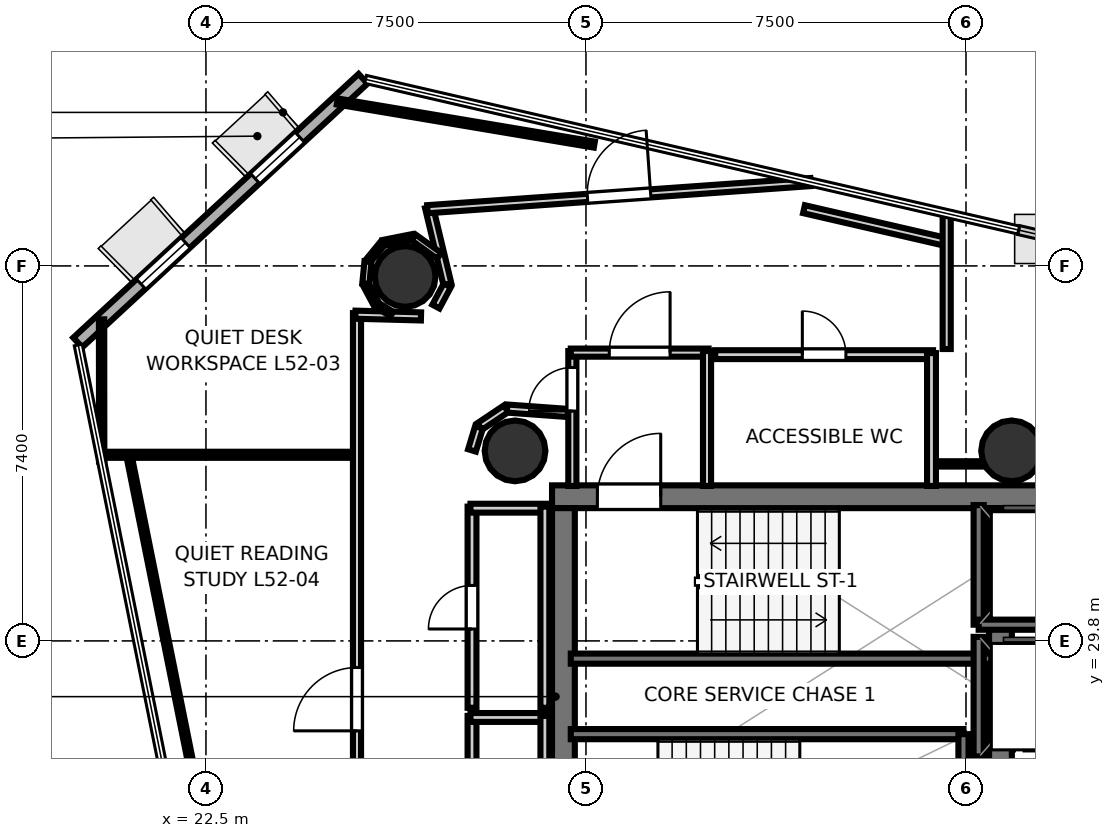
"""IFC4 building model, lengths in metres.
Left out: names, types, materials, properties, quantities, classifications, styles, units other than length and angle.
Written with IfcOpenShell. Run it as: python <this file> out.ifc"""

import sys

from ifc_helpers import new_model, si_unit, direction, frame, frame_2d, origin, origin_2d, place, context, subcontext, project, spatial, rectangle, hollow_circle, extrude, element, fill, save


model = new_model("IFC4")
c1 = context("Model", 3, precision=1e-05, world=origin(), true_north=direction((0.0, 1.0)))
c2 = subcontext(c1, "Body", "Model", "MODEL_VIEW")
j1 = project(units=[si_unit("LENGTHUNIT", "METRE"), si_unit("PLANEANGLEUNIT", "RADIAN")], contexts=[c1])
p1 = place(None, origin())
s1 = spatial("IfcSite", under=j1, at=p1, CompositionType="ELEMENT")
p2 = place(p1, origin())
s2 = spatial("IfcBuilding", under=s1, at=p2, CompositionType="ELEMENT")
p3 = place(p2, frame((0.0, 0.0, 204.0)))
s3 = spatial("IfcBuildingStorey", under=s2, at=p3, CompositionType="ELEMENT", Elevation=204.0)
p4 = place(p3, frame((29.33, 32.645, 0.0), z_axis=(0.0, 0.0, 1.0), x_axis=(1.0, 0.0, 0.0)))
e1 = element("IfcWall", 1, at=p4, inside=s3, PredefinedType="SHEAR", context=c2, shape_type="SweptSolid", body=[
    extrude(rectangle(XDim=10.52, YDim=0.45, at=frame_2d((5.26, 0.0))), origin(), (0.0, 0.0, 1.0), 3.52),
])
p5 = place(p4, frame((0.895, 0.0, 0.0)))
e2 = element("IfcOpeningElement", 2, at=p5, cuts=e1, PredefinedType="OPENING", context=c2, shape_type="SweptSolid", body=[
    extrude(rectangle(XDim=1.25, YDim=2.15, at=frame_2d((0.625, 1.075))), frame((0.0, 0.235, 0.0), z_axis=(0.0, -1.0, 0.0), x_axis=(1.0, 0.0, 0.0)), (0.0, 0.0, 1.0), 0.47),
])
for number, where, z_axis, x_axis in (
    (3, (29.555, 24.98, 0.0), (0.0, 0.0, 1.0), (0.0, 1.0, 0.0)),
    (4, (38.18, 24.98, 0.0), (0.0, 0.0, 1.0), (0.0, 1.0, 0.0)),
):
    element("IfcWall", number, at=place(p3, frame(where, z_axis=z_axis, x_axis=x_axis)), inside=s3, PredefinedType="SHEAR", context=c2, shape_type="SweptSolid", body=[
        extrude(rectangle(XDim=7.44, YDim=0.45, at=frame_2d((3.72, 0.0))), origin(), (0.0, 0.0, 1.0), 3.52),
    ])
for number, where, z_axis, x_axis in (
    (5, (28.6, 33.55, 0.0), (0.0, 0.0, 1.0), (1.0, 0.0, 0.0)),
    (6, (38.4, 33.55, 0.0), (0.0, 0.0, 1.0), (1.0, 0.0, 0.0)),
    (7, (26.431, 36.992, 0.0), (0.0, 0.0, 1.0), (1.0, 0.0, 0.0)),
):
    element("IfcColumn", number, at=place(p3, frame(where, z_axis=z_axis, x_axis=x_axis)), inside=s3, PredefinedType="COLUMN", context=c2, shape_type="SweptSolid", body=[
        extrude(hollow_circle(Radius=0.6, WallThickness=0.03, at=origin_2d()), origin(), (0.0, 0.0, 1.0), 3.7),
    ])
p6 = place(p3, frame((25.601, 40.893, 0.0), z_axis=(0.0, 0.0, 1.0), x_axis=(-0.734371177533, -0.678748092896, 0.0)))
e8 = element("IfcWall", 8, at=p6, inside=s3, PredefinedType="SOLIDWALL", context=c2, shape_type="SweptSolid", body=[
    extrude(rectangle(XDim=7.668, YDim=0.26, at=frame_2d((3.834, 0.0))), origin(), (0.0, 0.0, 1.0), 3.52),
])
p7 = place(p6, frame((1.7, 0.0, 0.9)))
e9 = element("IfcOpeningElement", 9, at=p7, cuts=e8, PredefinedType="OPENING", context=c2, shape_type="SweptSolid", body=[
    extrude(rectangle(XDim=1.2, YDim=2.0, at=frame_2d((0.6, 1.0))), frame((0.0, 0.14, 0.0), z_axis=(0.0, -1.0, 0.0), x_axis=(1.0, 0.0, 0.0)), (0.0, 0.0, 1.0), 0.28),
])
p8 = place(p6, frame((4.768, 0.0, 0.9)))
e10 = element("IfcOpeningElement", 10, at=p8, cuts=e8, PredefinedType="OPENING", context=c2, shape_type="SweptSolid", body=[
    extrude(rectangle(XDim=1.2, YDim=2.0, at=frame_2d((0.6, 1.0))), frame((0.0, 0.14, 0.0), z_axis=(0.0, -1.0, 0.0), x_axis=(1.0, 0.0, 0.0)), (0.0, 0.0, 1.0), 0.28),
])
p9 = place(p3, frame((29.7, 29.45, 0.0), z_axis=(0.0, 0.0, 1.0), x_axis=(1.0, 0.0, 0.0)))
e11 = element("IfcWall", 11, at=p9, inside=s3, PredefinedType="SOLIDWALL", context=c2, shape_type="SweptSolid", body=[
    extrude(rectangle(XDim=8.3, YDim=0.2, at=frame_2d((4.15, 0.0))), origin(), (0.0, 0.0, 1.0), 3.52),
])
p10 = place(p3, frame((29.7, 27.96, 0.0), z_axis=(0.0, 0.0, 1.0), x_axis=(1.0, 0.0, 0.0)))
e12 = element("IfcWall", 12, at=p10, inside=s3, PredefinedType="SOLIDWALL", context=c2, shape_type="SweptSolid", body=[
    extrude(rectangle(XDim=7.75, YDim=0.2, at=frame_2d((3.875, 0.0))), origin(), (0.0, 0.0, 1.0), 3.52),
])
p11 = place(p3, frame((37.45, 24.9, 0.0), z_axis=(0.0, 0.0, 1.0), x_axis=(0.0, 1.0, 0.0)))
e13 = element("IfcWall", 13, at=p11, inside=s3, PredefinedType="SOLIDWALL", context=c2, shape_type="SweptSolid", body=[
    extrude(rectangle(XDim=3.06, YDim=0.2, at=frame_2d((1.53, 0.0))), origin(), (0.0, 0.0, 1.0), 3.52),
])
p12 = place(p3, frame((37.75, 30.12, 0.0), z_axis=(0.0, 0.0, 1.0), x_axis=(0.0, 1.0, 0.0)))
e14 = element("IfcWall", 14, at=p12, inside=s3, PredefinedType="SOLIDWALL", context=c2, shape_type="SweptSolid", body=[
    extrude(rectangle(XDim=2.36, YDim=0.2, at=frame_2d((1.18, 0.0))), origin(), (0.0, 0.0, 1.0), 3.52),
])
p13 = place(p3, frame((37.75, 30.12, 0.0), z_axis=(0.0, 0.0, 1.0), x_axis=(1.0, 0.0, 0.0)))
e15 = element("IfcWall", 15, at=p13, inside=s3, PredefinedType="SOLIDWALL", context=c2, shape_type="SweptSolid", body=[
    extrude(rectangle(XDim=2.1, YDim=0.2, at=frame_2d((1.05, 0.0))), origin(), (0.0, 0.0, 1.0), 3.52),
])
p14 = place(p3, frame((37.75, 27.52, 0.0), z_axis=(0.0, 0.0, 1.0), x_axis=(0.0, 1.0, 0.0)))
e16 = element("IfcWall", 16, at=p14, inside=s3, PredefinedType="SOLIDWALL", context=c2, shape_type="SweptSolid", body=[
    extrude(rectangle(XDim=2.36, YDim=0.2, at=frame_2d((1.18, 0.0))), origin(), (0.0, 0.0, 1.0), 3.52),
])
p15 = place(p3, frame((29.731, 32.858, 0.0), z_axis=(0.0, 0.0, 1.0), x_axis=(0.0, 1.0, 0.0)))
e17 = element("IfcWall", 17, at=p15, inside=s3, PredefinedType="PARTITIONING", context=c2, shape_type="SweptSolid", body=[
    extrude(rectangle(XDim=2.662, YDim=0.16, at=frame_2d((1.331, 0.0))), origin(), (0.0, 0.0, 1.0), 2.84),
])
p16 = place(p15, frame((1.478, 0.0, 0.0)))
e18 = element("IfcOpeningElement", 18, at=p16, cuts=e17, PredefinedType="OPENING", context=c2, shape_type="SweptSolid", body=[
    extrude(rectangle(XDim=0.86, YDim=2.05, at=frame_2d((0.43, 1.025))), frame((0.0, 0.09, 0.0), z_axis=(0.0, -1.0, 0.0), x_axis=(1.0, 0.0, 0.0)), (0.0, 0.0, 1.0), 0.18),
])
p17 = place(p3, frame((29.7, 35.489, 0.0), z_axis=(0.0, 0.0, 1.0), x_axis=(1.0, 0.0, 0.0)))
e19 = element("IfcWall", 19, at=p17, inside=s3, PredefinedType="PARTITIONING", context=c2, shape_type="SweptSolid", body=[
    extrude(rectangle(XDim=2.72, YDim=0.16, at=frame_2d((1.36, 0.0))), origin(), (0.0, 0.0, 1.0), 2.84),
])
p18 = place(p17, frame((0.76, 0.0, 0.0)))
e20 = element("IfcOpeningElement", 20, at=p18, cuts=e19, PredefinedType="OPENING", context=c2, shape_type="SweptSolid", body=[
    extrude(rectangle(XDim=1.2, YDim=2.15, at=frame_2d((0.6, 1.075))), frame((0.0, 0.09, 0.0), z_axis=(0.0, -1.0, 0.0), x_axis=(1.0, 0.0, 0.0)), (0.0, 0.0, 1.0), 0.18),
])
p19 = place(p3, frame((32.389, 35.52, 0.0), z_axis=(0.0, 0.0, 1.0), x_axis=(0.0, -1.0, 0.0)))
e21 = element("IfcWall", 21, at=p19, inside=s3, PredefinedType="PARTITIONING", context=c2, shape_type="SweptSolid", body=[
    extrude(rectangle(XDim=2.662, YDim=0.16, at=frame_2d((1.331, 0.0))), origin(), (0.0, 0.0, 1.0), 2.84),
])
p20 = place(p3, frame((32.55, 35.449, 0.0), z_axis=(0.0, 0.0, 1.0), x_axis=(1.0, 0.0, 0.0)))
e22 = element("IfcWall", 22, at=p20, inside=s3, PredefinedType="PLUMBINGWALL", context=c2, shape_type="SweptSolid", body=[
    extrude(rectangle(XDim=4.3, YDim=0.175, at=frame_2d((2.15, 0.0))), origin(), (0.0, 0.0, 1.0), 2.84),
])
p21 = place(p20, frame((1.72, 0.0, 0.0)))
e23 = element("IfcOpeningElement", 23, at=p21, cuts=e22, PredefinedType="OPENING", context=c2, shape_type="SweptSolid", body=[
    extrude(rectangle(XDim=0.86, YDim=2.05, at=frame_2d((0.43, 1.025))), frame((0.0, 0.097, 0.0), z_axis=(0.0, -1.0, 0.0), x_axis=(1.0, 0.0, 0.0)), (0.0, 0.0, 1.0), 0.195),
])
p22 = place(p3, frame((36.819, 35.48, 0.0), z_axis=(0.0, 0.0, 1.0), x_axis=(0.0, -1.0, 0.0)))
e24 = element("IfcWall", 24, at=p22, inside=s3, PredefinedType="PLUMBINGWALL", context=c2, shape_type="SweptSolid", body=[
    extrude(rectangle(XDim=2.622, YDim=0.175, at=frame_2d((1.311, 0.0))), origin(), (0.0, 0.0, 1.0), 2.84),
])
p23 = place(p3, frame((27.751, 25.0, 0.0), z_axis=(0.0, 0.0, 1.0), x_axis=(0.0, 1.0, 0.0)))
e25 = element("IfcWall", 25, at=p23, inside=s3, PredefinedType="PLUMBINGWALL", context=c2, shape_type="SweptSolid", body=[
    extrude(rectangle(XDim=3.32, YDim=0.175, at=frame_2d((1.66, 0.0))), origin(), (0.0, 0.0, 1.0), 2.84),
])
p24 = place(p23, frame((1.21, 0.0, 0.0)))
e26 = element("IfcOpeningElement", 26, at=p24, cuts=e25, PredefinedType="OPENING", context=c2, shape_type="SweptSolid", body=[
    extrude(rectangle(XDim=0.9, YDim=2.1, at=frame_2d((0.45, 1.05))), frame((0.0, 0.097, 0.0), z_axis=(0.0, -1.0, 0.0), x_axis=(1.0, 0.0, 0.0)), (0.0, 0.0, 1.0), 0.195),
])
p25 = place(p3, frame((27.72, 28.289, 0.0), z_axis=(0.0, 0.0, 1.0), x_axis=(1.0, 0.0, 0.0)))
e27 = element("IfcWall", 27, at=p25, inside=s3, PredefinedType="PLUMBINGWALL", context=c2, shape_type="SweptSolid", body=[
    extrude(rectangle(XDim=1.5, YDim=0.175, at=frame_2d((0.75, 0.0))), origin(), (0.0, 0.0, 1.0), 2.84),
])
p26 = place(p3, frame((29.189, 28.32, 0.0), z_axis=(0.0, 0.0, 1.0), x_axis=(0.0, -1.0, 0.0)))
e28 = element("IfcWall", 28, at=p26, inside=s3, PredefinedType="PLUMBINGWALL", context=c2, shape_type="SweptSolid", body=[
    extrude(rectangle(XDim=3.32, YDim=0.175, at=frame_2d((1.66, 0.0))), origin(), (0.0, 0.0, 1.0), 2.84),
])
p27 = place(p3, frame((27.751, 28.48, 0.0), z_axis=(0.0, 0.0, 1.0), x_axis=(0.0, 1.0, 0.0)))
e29 = element("IfcWall", 29, at=p27, inside=s3, PredefinedType="PLUMBINGWALL", context=c2, shape_type="SweptSolid", body=[
    extrude(rectangle(XDim=3.97, YDim=0.175, at=frame_2d((1.985, 0.0))), origin(), (0.0, 0.0, 1.0), 2.84),
])
p28 = place(p27, frame((1.555, 0.0, 0.0)))
e30 = element("IfcOpeningElement", 30, at=p28, cuts=e29, PredefinedType="OPENING", context=c2, shape_type="SweptSolid", body=[
    extrude(rectangle(XDim=0.86, YDim=2.05, at=frame_2d((0.43, 1.025))), frame((0.0, 0.097, 0.0), z_axis=(0.0, -1.0, 0.0), x_axis=(1.0, 0.0, 0.0)), (0.0, 0.0, 1.0), 0.195),
])
p29 = place(p3, frame((27.72, 32.419, 0.0), z_axis=(0.0, 0.0, 1.0), x_axis=(1.0, 0.0, 0.0)))
e31 = element("IfcWall", 31, at=p29, inside=s3, PredefinedType="PLUMBINGWALL", context=c2, shape_type="SweptSolid", body=[
    extrude(rectangle(XDim=1.5, YDim=0.175, at=frame_2d((0.75, 0.0))), origin(), (0.0, 0.0, 1.0), 2.84),
])
p30 = place(p3, frame((29.189, 32.45, 0.0), z_axis=(0.0, 0.0, 1.0), x_axis=(0.0, -1.0, 0.0)))
e32 = element("IfcWall", 32, at=p30, inside=s3, PredefinedType="PLUMBINGWALL", context=c2, shape_type="SweptSolid", body=[
    extrude(rectangle(XDim=3.97, YDim=0.175, at=frame_2d((1.985, 0.0))), origin(), (0.0, 0.0, 1.0), 2.84),
])
p31 = place(p3, frame((27.265, 36.839, 0.0), z_axis=(0.0, 0.0, 1.0), x_axis=(-0.232734022169, 0.972540423286, 0.0)))
e33 = element("IfcWall", 33, at=p31, inside=s3, PredefinedType="PARTITIONING", context=c2, shape_type="SweptSolid", body=[
    extrude(rectangle(XDim=1.561, YDim=0.16, at=frame_2d((0.781, 0.0))), origin(), (0.0, 0.0, 1.0), 2.84),
])
p32 = place(p3, frame((26.872, 38.319, 0.0), z_axis=(0.0, 0.0, 1.0), x_axis=(0.997497948336, 0.070695424642, 0.0)))
e34 = element("IfcWall", 34, at=p32, inside=s3, PredefinedType="PARTITIONING", context=c2, shape_type="SweptSolid", body=[
    extrude(rectangle(XDim=7.58, YDim=0.16, at=frame_2d((3.79, 0.0))), origin(), (0.0, 0.0, 1.0), 2.84),
])
p33 = place(p32, frame((3.165, 0.0, 0.0)))
e35 = element("IfcOpeningElement", 35, at=p33, cuts=e34, PredefinedType="OPENING", context=c2, shape_type="SweptSolid", body=[
    extrude(rectangle(XDim=1.25, YDim=2.2, at=frame_2d((0.625, 1.1))), frame((0.0, 0.09, 0.0), z_axis=(0.0, -1.0, 0.0), x_axis=(1.0, 0.0, 0.0)), (0.0, 0.0, 1.0), 0.18),
])
p34 = place(p3, frame((34.302, 38.32, 0.0), z_axis=(0.0, 0.0, 1.0), x_axis=(0.974391195695, -0.224859506699, 0.0)))
e36 = element("IfcWall", 36, at=p34, inside=s3, PredefinedType="PARTITIONING", context=c2, shape_type="SweptSolid", body=[
    extrude(rectangle(XDim=2.915, YDim=0.16, at=frame_2d((1.458, 0.0))), origin(), (0.0, 0.0, 1.0), 2.84),
])
p35 = place(p3, frame((37.119, 38.255, 0.0), z_axis=(0.0, 0.0, 1.0), x_axis=(0.0, -1.0, 0.0)))
e37 = element("IfcWall", 37, at=p35, inside=s3, PredefinedType="PARTITIONING", context=c2, shape_type="SweptSolid", body=[
    extrude(rectangle(XDim=2.695, YDim=0.16, at=frame_2d((1.348, 0.0))), origin(), (0.0, 0.0, 1.0), 2.84),
])
p36 = place(p3, frame((29.64, 34.299, 0.0), z_axis=(0.0, 0.0, 1.0), x_axis=(-0.997392224386, 0.072171675429, 0.0)))
e38 = element("IfcWall", 38, at=p36, inside=s3, PredefinedType="PARTITIONING", context=c2, shape_type="SweptSolid", body=[
    extrude(rectangle(XDim=1.201, YDim=0.16, at=frame_2d((0.601, 0.0))), origin(), (0.0, 0.0, 1.0), 2.84),
])
p37 = place(p3, frame((28.423, 34.38, 0.0), z_axis=(0.0, 0.0, 1.0), x_axis=(-0.831571279003, -0.555418047903, 0.0)))
e39 = element("IfcWall", 39, at=p37, inside=s3, PredefinedType="PARTITIONING", context=c2, shape_type="SweptSolid", body=[
    extrude(rectangle(XDim=0.628, YDim=0.16, at=frame_2d((0.314, 0.0))), origin(), (0.0, 0.0, 1.0), 2.84),
])
p38 = place(p3, frame((27.888, 34.015, 0.0), z_axis=(0.0, 0.0, 1.0), x_axis=(-0.290263585829, -0.956946733492, 0.0)))
e40 = element("IfcWall", 40, at=p38, inside=s3, PredefinedType="PARTITIONING", context=c2, shape_type="SweptSolid", body=[
    extrude(rectangle(XDim=0.476, YDim=0.16, at=frame_2d((0.238, 0.0))), origin(), (0.0, 0.0, 1.0), 2.84),
])
p39 = place(p3, frame((25.481, 18.05, 0.0), z_axis=(0.0, 0.0, 1.0), x_axis=(0.0, 1.0, 0.0)))
e41 = element("IfcWall", 41, at=p39, inside=s3, PredefinedType="PARTITIONING", context=c2, shape_type="SweptSolid", body=[
    extrude(rectangle(XDim=18.219, YDim=0.16, at=frame_2d((9.109, 0.0))), origin(), (0.0, 0.0, 1.0), 2.84),
])
p40 = place(p39, frame((0.23, 0.0, 0.0)))
e42 = element("IfcOpeningElement", 42, at=p40, cuts=e41, PredefinedType="OPENING", context=c2, shape_type="SweptSolid", body=[
    extrude(rectangle(XDim=1.05, YDim=2.15, at=frame_2d((0.525, 1.075))), frame((0.0, 0.09, 0.0), z_axis=(0.0, -1.0, 0.0), x_axis=(1.0, 0.0, 0.0)), (0.0, 0.0, 1.0), 0.18),
])
p41 = place(p39, frame((9.975, 0.0, 0.0)))
e43 = element("IfcOpeningElement", 43, at=p41, cuts=e41, PredefinedType="OPENING", context=c2, shape_type="SweptSolid", body=[
    extrude(rectangle(XDim=1.25, YDim=2.2, at=frame_2d((0.625, 1.1))), frame((0.0, 0.09, 0.0), z_axis=(0.0, -1.0, 0.0), x_axis=(1.0, 0.0, 0.0)), (0.0, 0.0, 1.0), 0.18),
])
p42 = place(p3, frame((25.449, 36.238, 0.0), z_axis=(0.0, 0.0, 1.0), x_axis=(0.999651698073, -0.026390955635, 0.0)))
e44 = element("IfcWall", 44, at=p42, inside=s3, PredefinedType="PARTITIONING", context=c2, shape_type="SweptSolid", body=[
    extrude(rectangle(XDim=1.295, YDim=0.16, at=frame_2d((0.647, 0.0))), origin(), (0.0, 0.0, 1.0), 2.84),
])
p43 = place(p3, frame((27.038, 36.398, 0.0), z_axis=(0.0, 0.0, 1.0), x_axis=(0.471865548338, 0.881670519123, 0.0)))
e45 = element("IfcWall", 45, at=p43, inside=s3, PredefinedType="PARTITIONING", context=c2, shape_type="SweptSolid", body=[
    extrude(rectangle(XDim=0.476, YDim=0.16, at=frame_2d((0.238, 0.0))), origin(), (0.0, 0.0, 1.0), 2.84),
])
p44 = place(p3, frame((39.8, 33.293, 0.0), z_axis=(0.0, 0.0, 1.0), x_axis=(-1.0, 0.0, 0.0)))
e46 = element("IfcWall", 46, at=p44, inside=s3, PredefinedType="PARTITIONING", context=c2, shape_type="SweptSolid", body=[
    extrude(rectangle(XDim=2.87, YDim=0.105, at=frame_2d((1.435, 0.0))), origin(), (0.0, 0.0, 1.0), 2.84),
])
p45 = place(p3, frame((27.102, 37.399, 0.0), z_axis=(0.0, 0.0, 1.0), x_axis=(-0.811712980853, 0.584056535546, 0.0)))
e47 = element("IfcWall", 47, at=p45, inside=s3, PredefinedType="PARTITIONING", context=c2, shape_type="SweptSolid", body=[
    extrude(rectangle(XDim=0.622, YDim=0.14, at=frame_2d((0.311, 0.0))), origin(), (0.0, 0.0, 1.0), 2.84),
])
p46 = place(p3, frame((26.573, 37.768, 0.0), z_axis=(0.0, 0.0, 1.0), x_axis=(-0.980773892286, -0.195147565217, 0.0)))
e48 = element("IfcWall", 48, at=p46, inside=s3, PredefinedType="PARTITIONING", context=c2, shape_type="SweptSolid", body=[
    extrude(rectangle(XDim=0.582, YDim=0.12, at=frame_2d((0.291, 0.0))), origin(), (0.0, 0.0, 1.0), 2.84),
])
p47 = place(p3, frame((25.985, 37.644, 0.0), z_axis=(0.0, 0.0, 1.0), x_axis=(-0.634562438402, -0.772871601088, 0.0)))
e49 = element("IfcWall", 49, at=p47, inside=s3, PredefinedType="PARTITIONING", context=c2, shape_type="SweptSolid", body=[
    extrude(rectangle(XDim=0.441, YDim=0.105, at=frame_2d((0.221, 0.0))), origin(), (0.0, 0.0, 1.0), 2.84),
])
p48 = place(p3, frame((25.698, 37.286, 0.0), z_axis=(0.0, 0.0, 1.0), x_axis=(-0.097915215421, -0.995194760129, 0.0)))
e50 = element("IfcWall", 50, at=p48, inside=s3, PredefinedType="PARTITIONING", context=c2, shape_type="SweptSolid", body=[
    extrude(rectangle(XDim=0.441, YDim=0.14, at=frame_2d((0.221, 0.0))), origin(), (0.0, 0.0, 1.0), 2.84),
])
p49 = place(p3, frame((25.658, 36.829, 0.0), z_axis=(0.0, 0.0, 1.0), x_axis=(0.471392110461, -0.881923737177, 0.0)))
e51 = element("IfcWall", 51, at=p49, inside=s3, PredefinedType="PARTITIONING", context=c2, shape_type="SweptSolid", body=[
    extrude(rectangle(XDim=0.441, YDim=0.12, at=frame_2d((0.221, 0.0))), origin(), (0.0, 0.0, 1.0), 2.84),
])
p50 = place(p3, frame((25.877, 36.428, 0.0), z_axis=(0.0, 0.0, 1.0), x_axis=(0.852322728649, -0.523016219853, 0.0)))
e52 = element("IfcWall", 52, at=p50, inside=s3, PredefinedType="PARTITIONING", context=c2, shape_type="SweptSolid", body=[
    extrude(rectangle(XDim=0.34, YDim=0.105, at=frame_2d((0.17, 0.0))), origin(), (0.0, 0.0, 1.0), 2.84),
])
p51 = place(p3, frame((25.37, 33.473, 0.0), z_axis=(0.0, 0.0, 1.0), x_axis=(-1.0, 0.0, 0.0)))
e53 = element("IfcWall", 53, at=p51, inside=s3, PredefinedType="PARTITIONING", context=c2, shape_type="SweptSolid", body=[
    extrude(rectangle(XDim=4.975, YDim=0.12, at=frame_2d((2.488, 0.0))), origin(), (0.0, 0.0, 1.0), 2.84),
])
p52 = place(p3, frame((20.442, 33.34, 0.0), z_axis=(0.0, 0.0, 1.0), x_axis=(-0.000608960305, 0.999999814584, 0.0)))
e54 = element("IfcWall", 54, at=p52, inside=s3, PredefinedType="PARTITIONING", context=c2, shape_type="SweptSolid", body=[
    extrude(rectangle(XDim=2.806, YDim=0.105, at=frame_2d((1.403, 0.0))), origin(), (0.0, 0.0, 1.0), 2.84),
])
p53 = place(p3, frame((25.092, 40.445, 0.0), z_axis=(0.0, 0.0, 1.0), x_axis=(0.986208576086, -0.165507233844, 0.0)))
e55 = element("IfcWall", 55, at=p53, inside=s3, PredefinedType="PARTITIONING", context=c2, shape_type="SweptSolid", body=[
    extrude(rectangle(XDim=5.144, YDim=0.12, at=frame_2d((2.572, 0.0))), origin(), (0.0, 0.0, 1.0), 2.84),
])
p54 = place(p3, frame((22.891, 23.948, 0.0), z_axis=(0.0, 0.0, 1.0), x_axis=(-0.196981324141, 0.980407240865, 0.0)))
e56 = element("IfcWall", 56, at=p54, inside=s3, PredefinedType="PARTITIONING", context=c2, shape_type="SweptSolid", body=[
    extrude(rectangle(XDim=9.604, YDim=0.105, at=frame_2d((4.802, 0.0))), origin(), (0.0, 0.0, 1.0), 2.84),
])
p55 = place(p5, origin())
e57 = element("IfcDoor", 57, at=p55, inside=s3, OperationType="SINGLE_SWING_RIGHT", PredefinedType="DOOR", context=c2, shape_type="SweptSolid", body=[
    extrude(rectangle(XDim=1.25, YDim=2.15, at=frame_2d((0.625, 1.075))), frame((0.0, 0.025, 0.0), z_axis=(0.0, -1.0, 0.0), x_axis=(1.0, 0.0, 0.0)), (0.0, 0.0, 1.0), 0.05),
])
fill(e2, e57)
p56 = place(p18, origin())
e58 = element("IfcDoor", 58, at=p56, inside=s3, OperationType="SINGLE_SWING_RIGHT", PredefinedType="DOOR", context=c2, shape_type="SweptSolid", body=[
    extrude(rectangle(XDim=1.2, YDim=2.15, at=frame_2d((0.6, 1.075))), frame((0.0, 0.025, 0.0), z_axis=(0.0, -1.0, 0.0), x_axis=(1.0, 0.0, 0.0)), (0.0, 0.0, 1.0), 0.05),
])
fill(e20, e58)
p57 = place(p21, origin())
e59 = element("IfcDoor", 59, at=p57, inside=s3, OperationType="SINGLE_SWING_LEFT", PredefinedType="DOOR", context=c2, shape_type="SweptSolid", body=[
    extrude(rectangle(XDim=0.86, YDim=2.05, at=frame_2d((0.43, 1.025))), frame((0.0, 0.025, 0.0), z_axis=(0.0, -1.0, 0.0), x_axis=(1.0, 0.0, 0.0)), (0.0, 0.0, 1.0), 0.05),
])
fill(e23, e59)
p58 = place(p28, origin())
e60 = element("IfcDoor", 60, at=p58, inside=s3, OperationType="SINGLE_SWING_LEFT", PredefinedType="DOOR", context=c2, shape_type="SweptSolid", body=[
    extrude(rectangle(XDim=0.86, YDim=2.05, at=frame_2d((0.43, 1.025))), frame((0.0, 0.025, 0.0), z_axis=(0.0, -1.0, 0.0), x_axis=(1.0, 0.0, 0.0)), (0.0, 0.0, 1.0), 0.05),
])
fill(e30, e60)
p59 = place(p16, origin())
e61 = element("IfcDoor", 61, at=p59, inside=s3, OperationType="SINGLE_SWING_LEFT", PredefinedType="DOOR", context=c2, shape_type="SweptSolid", body=[
    extrude(rectangle(XDim=0.86, YDim=2.05, at=frame_2d((0.43, 1.025))), frame((0.0, 0.025, 0.0), z_axis=(0.0, -1.0, 0.0), x_axis=(1.0, 0.0, 0.0)), (0.0, 0.0, 1.0), 0.05),
])
fill(e18, e61)
p60 = place(p33, origin())
e62 = element("IfcDoor", 62, at=p60, inside=s3, OperationType="SINGLE_SWING_RIGHT", PredefinedType="DOOR", context=c2, shape_type="SweptSolid", body=[
    extrude(rectangle(XDim=1.25, YDim=2.2, at=frame_2d((0.625, 1.1))), frame((0.0, 0.025, 0.0), z_axis=(0.0, -1.0, 0.0), x_axis=(1.0, 0.0, 0.0)), (0.0, 0.0, 1.0), 0.05),
])
fill(e35, e62)
p61 = place(p41, origin())
e63 = element("IfcDoor", 63, at=p61, inside=s3, OperationType="SINGLE_SWING_LEFT", PredefinedType="DOOR", context=c2, shape_type="SweptSolid", body=[
    extrude(rectangle(XDim=1.25, YDim=2.2, at=frame_2d((0.625, 1.1))), frame((0.0, 0.025, 0.0), z_axis=(0.0, -1.0, 0.0), x_axis=(1.0, 0.0, 0.0)), (0.0, 0.0, 1.0), 0.05),
])
fill(e43, e63)
p62 = place(p7, origin())
e64 = element("IfcWindow", 64, at=p62, inside=s3, PartitioningType="SINGLE_PANEL", PredefinedType="WINDOW", context=c2, shape_type="SweptSolid", body=[
    extrude(rectangle(XDim=1.2, YDim=2.0, at=frame_2d((0.6, 1.0))), frame((0.0, 0.03, 0.0), z_axis=(0.0, -1.0, 0.0), x_axis=(1.0, 0.0, 0.0)), (0.0, 0.0, 1.0), 0.06),
])
fill(e9, e64)
p63 = place(p8, origin())
e65 = element("IfcWindow", 65, at=p63, inside=s3, PartitioningType="SINGLE_PANEL", PredefinedType="WINDOW", context=c2, shape_type="SweptSolid", body=[
    extrude(rectangle(XDim=1.2, YDim=2.0, at=frame_2d((0.6, 1.0))), frame((0.0, 0.03, 0.0), z_axis=(0.0, -1.0, 0.0), x_axis=(1.0, 0.0, 0.0)), (0.0, 0.0, 1.0), 0.06),
])
fill(e10, e65)
save(model, sys.argv[1])
